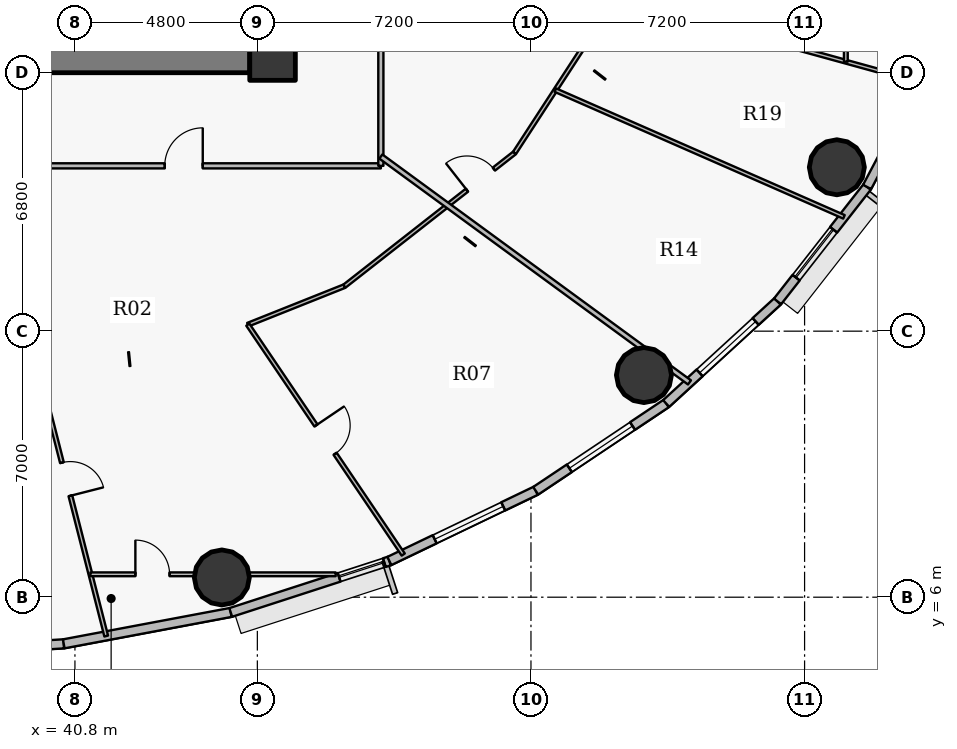
"""IFC4 building model, lengths in metres.
Left out: names, types, materials, properties, quantities, classifications, styles, units other than length and angle.
Written with IfcOpenShell. Run it as: python <this file> out.ifc"""

import sys

from ifc_helpers import new_model, si_unit, direction, frame, frame_2d, origin, origin_2d, place, context, subcontext, project, spatial, rectangle, hollow_circle, extrude, source, transform, mapped, element, fill, save


model = new_model("IFC4")
c1 = context("Model", 3, precision=1e-05, world=origin(), true_north=direction((0.0, 1.0)))
c2 = subcontext(c1, "Body", "Model", "MODEL_VIEW")
j1 = project(units=[si_unit("LENGTHUNIT", "METRE"), si_unit("PLANEANGLEUNIT", "RADIAN")], contexts=[c1])
p1 = place(None, origin())
s1 = spatial("IfcSite", under=j1, at=p1, CompositionType="ELEMENT")
p2 = place(p1, origin())
s2 = spatial("IfcBuilding", under=s1, at=p2, CompositionType="ELEMENT")
p3 = place(p2, frame((0.0, 0.0, 134.7)))
s3 = spatial("IfcBuildingStorey", under=s2, at=p3, CompositionType="ELEMENT", Elevation=134.7)
p4 = place(p3, frame((46.0, 20.2, 0.0), z_axis=(0.0, 0.0, 1.0), x_axis=(1.0, 0.0, 0.0)))
e1 = element("IfcColumn", 1, at=p4, inside=s3, PredefinedType="COLUMN", context=c2, shape_type="SweptSolid", body=[
    extrude(rectangle(XDim=1.2, YDim=1.2, at=origin_2d()), origin(), (0.0, 0.0, 1.0), 3.75),
])
p5 = place(p3, frame((45.4, 20.2, 0.0), z_axis=(0.0, 0.0, 1.0), x_axis=(-1.0, 0.0, 0.0)))
e2 = element("IfcWall", 2, at=p5, inside=s3, PredefinedType="SHEAR", context=c2, shape_type="SweptSolid", body=[
    extrude(rectangle(XDim=18.8, YDim=0.8, at=frame_2d((9.4, 0.0))), origin(), (0.0, 0.0, 1.0), 2.95),
])
p6 = place(p5, frame((10.15, 0.0, 0.0)))
e3 = element("IfcOpeningElement", 3, at=p6, cuts=e2, PredefinedType="OPENING", context=c2, shape_type="SweptSolid", body=[
    extrude(rectangle(XDim=1.15, YDim=2.15, at=origin_2d()), frame((0.575, 0.41, 1.075), z_axis=(0.0, -1.0, 0.0), x_axis=(1.0, 0.0, 0.0)), (0.0, 0.0, 1.0), 0.82),
])
for number, where, z_axis, x_axis in (
    (4, (44.666, 6.519, 0.0), (0.0, 0.0, 1.0), (1.0, 0.0, 0.0)),
    (5, (55.773, 11.844, 0.0), (0.0, 0.0, 1.0), (1.0, 0.0, 0.0)),
    (6, (60.849, 17.312, 0.0), (0.0, 0.0, 1.0), (1.0, 0.0, 0.0)),
):
    element("IfcColumn", number, at=place(p3, frame(where, z_axis=z_axis, x_axis=x_axis)), inside=s3, PredefinedType="COLUMN", context=c2, shape_type="SweptSolid", body=[
        extrude(hollow_circle(Radius=0.725, WallThickness=0.042, at=origin_2d()), origin(), (0.0, 0.0, 1.0), 3.75),
    ])
p7 = place(p3, frame((40.506, 4.773, 0.0), z_axis=(0.0, 0.0, 1.0), x_axis=(-0.998107531589, -0.061492726276, 0.0)))
e7 = element("IfcWall", 7, at=p7, inside=s3, PredefinedType="SOLIDWALL", context=c2, shape_type="SweptSolid", body=[
    extrude(rectangle(XDim=4.514, YDim=0.24, at=frame_2d((2.257, 0.0))), origin(), (0.0, 0.0, 1.0), 3.5),
])
p8 = place(p7, frame((1.257, 0.0, 0.9)))
e8 = element("IfcOpeningElement", 8, at=p8, cuts=e7, PredefinedType="OPENING", context=c2, shape_type="SweptSolid", body=[
    extrude(rectangle(XDim=2.0, YDim=1.75, at=origin_2d()), frame((1.0, 0.13, 0.875), z_axis=(0.0, -1.0, 0.0), x_axis=(1.0, 0.0, 0.0)), (0.0, 0.0, 1.0), 0.26),
])
p9 = place(p3, frame((44.9, 5.599, 0.0), z_axis=(0.0, 0.0, 1.0), x_axis=(-0.982789252177, -0.184730305596, 0.0)))
e9 = element("IfcWall", 9, at=p9, inside=s3, PredefinedType="SOLIDWALL", context=c2, shape_type="SweptSolid", body=[
    extrude(rectangle(XDim=4.471, YDim=0.24, at=frame_2d((2.235, 0.0))), origin(), (0.0, 0.0, 1.0), 3.5),
])
p10 = place(p3, frame((49.074, 6.953, 0.0), z_axis=(0.0, 0.0, 1.0), x_axis=(-0.951211346073, -0.308540070495, 0.0)))
e10 = element("IfcWall", 10, at=p10, inside=s3, PredefinedType="SOLIDWALL", context=c2, shape_type="SweptSolid", body=[
    extrude(rectangle(XDim=4.388, YDim=0.24, at=frame_2d((2.194, 0.0))), origin(), (0.0, 0.0, 1.0), 3.5),
])
p11 = place(p10, frame((0.14, 0.0, 0.9)))
e11 = element("IfcOpeningElement", 11, at=p11, cuts=e10, PredefinedType="OPENING", context=c2, shape_type="SweptSolid", body=[
    extrude(rectangle(XDim=1.25, YDim=1.65, at=origin_2d()), frame((0.625, 0.13, 0.825), z_axis=(0.0, -1.0, 0.0), x_axis=(1.0, 0.0, 0.0)), (0.0, 0.0, 1.0), 0.26),
])
p12 = place(p3, frame((52.925, 8.801, 0.0), z_axis=(0.0, 0.0, 1.0), x_axis=(-0.901589935876, -0.432591709962, 0.0)))
e12 = element("IfcWall", 12, at=p12, inside=s3, PredefinedType="SOLIDWALL", context=c2, shape_type="SweptSolid", body=[
    extrude(rectangle(XDim=4.272, YDim=0.24, at=frame_2d((2.136, 0.0))), origin(), (0.0, 0.0, 1.0), 3.5),
])
p13 = place(p12, frame((0.949, 0.0, 0.9)))
e13 = element("IfcOpeningElement", 13, at=p13, cuts=e12, PredefinedType="OPENING", context=c2, shape_type="SweptSolid", body=[
    extrude(rectangle(XDim=2.0, YDim=1.75, at=origin_2d()), frame((1.0, 0.13, 0.875), z_axis=(0.0, -1.0, 0.0), x_axis=(1.0, 0.0, 0.0)), (0.0, 0.0, 1.0), 0.26),
])
p14 = place(p3, frame((56.358, 11.097, 0.0), z_axis=(0.0, 0.0, 1.0), x_axis=(-0.831221811447, -0.555940914284, 0.0)))
e14 = element("IfcWall", 14, at=p14, inside=s3, PredefinedType="SOLIDWALL", context=c2, shape_type="SweptSolid", body=[
    extrude(rectangle(XDim=4.13, YDim=0.24, at=frame_2d((2.065, 0.0))), origin(), (0.0, 0.0, 1.0), 3.5),
])
p15 = place(p14, frame((1.065, 0.0, 0.9)))
e15 = element("IfcOpeningElement", 15, at=p15, cuts=e14, PredefinedType="OPENING", context=c2, shape_type="SweptSolid", body=[
    extrude(rectangle(XDim=2.0, YDim=1.75, at=origin_2d()), frame((1.0, 0.13, 0.875), z_axis=(0.0, -1.0, 0.0), x_axis=(1.0, 0.0, 0.0)), (0.0, 0.0, 1.0), 0.26),
])
p16 = place(p3, frame((59.289, 13.783, 0.0), z_axis=(0.0, 0.0, 1.0), x_axis=(-0.737113356241, -0.675769117414, 0.0)))
e16 = element("IfcWall", 16, at=p16, inside=s3, PredefinedType="SOLIDWALL", context=c2, shape_type="SweptSolid", body=[
    extrude(rectangle(XDim=3.976, YDim=0.24, at=frame_2d((1.988, 0.0))), origin(), (0.0, 0.0, 1.0), 3.5),
])
p17 = place(p16, frame((0.783, 0.0, 0.9)))
e17 = element("IfcOpeningElement", 17, at=p17, cuts=e16, PredefinedType="OPENING", context=c2, shape_type="SweptSolid", body=[
    extrude(rectangle(XDim=2.0, YDim=1.75, at=origin_2d()), frame((1.0, 0.13, 0.875), z_axis=(0.0, -1.0, 0.0), x_axis=(1.0, 0.0, 0.0)), (0.0, 0.0, 1.0), 0.26),
])
p18 = place(p3, frame((61.645, 16.794, 0.0), z_axis=(0.0, 0.0, 1.0), x_axis=(-0.616272103517, -0.787533297345, 0.0)))
e18 = element("IfcWall", 18, at=p18, inside=s3, PredefinedType="SOLIDWALL", context=c2, shape_type="SweptSolid", body=[
    extrude(rectangle(XDim=3.823, YDim=0.24, at=frame_2d((1.912, 0.0))), origin(), (0.0, 0.0, 1.0), 3.5),
])
p19 = place(p18, frame((1.43, 0.0, 0.9)))
e19 = element("IfcOpeningElement", 19, at=p19, cuts=e18, PredefinedType="OPENING", context=c2, shape_type="SweptSolid", body=[
    extrude(rectangle(XDim=1.6, YDim=1.75, at=origin_2d()), frame((0.8, 0.13, 0.875), z_axis=(0.0, -1.0, 0.0), x_axis=(1.0, 0.0, 0.0)), (0.0, 0.0, 1.0), 0.26),
])
p20 = place(p3, frame((63.37, 20.055, 0.0), z_axis=(0.0, 0.0, 1.0), x_axis=(-0.467614004126, -0.883932770716, 0.0)))
e20 = element("IfcWall", 20, at=p20, inside=s3, PredefinedType="SOLIDWALL", context=c2, shape_type="SweptSolid", body=[
    extrude(rectangle(XDim=3.689, YDim=0.24, at=frame_2d((1.844, 0.0))), origin(), (0.0, 0.0, 1.0), 3.5),
])
p21 = place(p3, frame((38.477, 17.35, 0.0), z_axis=(0.0, 0.0, 1.0), x_axis=(1.0, 0.0, 0.0)))
e21 = element("IfcWall", 21, at=p21, inside=s3, PredefinedType="PARTITIONING", context=c2, shape_type="SweptSolid", body=[
    extrude(rectangle(XDim=10.373, YDim=0.135, at=frame_2d((5.187, 0.0))), origin(), (0.0, 0.0, 1.0), 2.935),
])
p22 = place(p21, frame((4.687, 0.0, 0.0)))
e22 = element("IfcOpeningElement", 22, at=p22, cuts=e21, PredefinedType="OPENING", context=c2, shape_type="SweptSolid", body=[
    extrude(rectangle(XDim=1.0, YDim=2.15, at=origin_2d()), frame((0.5, 0.078, 1.075), z_axis=(0.0, -1.0, 0.0), x_axis=(1.0, 0.0, 0.0)), (0.0, 0.0, 1.0), 0.155),
])
p23 = place(p3, frame((39.92, 11.645, 0.0), z_axis=(0.0, 0.0, 1.0), x_axis=(0.24735773306, -0.968924224021, 0.0)))
e23 = element("IfcWall", 23, at=p23, inside=s3, PredefinedType="PARTITIONING", context=c2, shape_type="SweptSolid", body=[
    extrude(rectangle(XDim=6.881, YDim=0.1, at=frame_2d((3.441, 0.0))), origin(), (0.0, 0.0, 1.0), 2.935),
])
p24 = place(p23, frame((2.172, 0.0, 0.0)))
e24 = element("IfcOpeningElement", 24, at=p24, cuts=e23, PredefinedType="OPENING", context=c2, shape_type="SweptSolid", body=[
    extrude(rectangle(XDim=0.9, YDim=2.1, at=origin_2d()), frame((0.45, 0.06, 1.05), z_axis=(0.0, -1.0, 0.0), x_axis=(1.0, 0.0, 0.0)), (0.0, 0.0, 1.0), 0.12),
])
p25 = place(p3, frame((41.208, 6.603, 0.0), z_axis=(0.0, 0.0, 1.0), x_axis=(1.0, 0.0, 0.0)))
e25 = element("IfcWall", 25, at=p25, inside=s3, PredefinedType="PARTITIONING", context=c2, shape_type="SweptSolid", body=[
    extrude(rectangle(XDim=6.453, YDim=0.1, at=frame_2d((3.227, 0.0))), origin(), (0.0, 0.0, 1.0), 2.935),
])
p26 = place(p25, frame((1.183, 0.0, 0.0)))
e26 = element("IfcOpeningElement", 26, at=p26, cuts=e25, PredefinedType="OPENING", context=c2, shape_type="SweptSolid", body=[
    extrude(rectangle(XDim=0.9, YDim=2.1, at=origin_2d()), frame((0.45, 0.06, 1.05), z_axis=(0.0, -1.0, 0.0), x_axis=(1.0, 0.0, 0.0)), (0.0, 0.0, 1.0), 0.12),
])
p27 = place(p3, frame((45.35, 13.17, 0.0), z_axis=(0.0, 0.0, 1.0), x_axis=(0.928802486491, 0.370575149044, 0.0)))
e27 = element("IfcWall", 27, at=p27, inside=s3, PredefinedType="PARTITIONING", context=c2, shape_type="SweptSolid", body=[
    extrude(rectangle(XDim=2.736, YDim=0.1, at=frame_2d((1.368, 0.0))), origin(), (0.0, 0.0, 1.0), 3.5),
])
p28 = place(p3, frame((45.35, 13.17, 0.0), z_axis=(0.0, 0.0, 1.0), x_axis=(0.560082631059, -0.828436748573, 0.0)))
e28 = element("IfcWall", 28, at=p28, inside=s3, PredefinedType="PARTITIONING", context=c2, shape_type="SweptSolid", body=[
    extrude(rectangle(XDim=7.301, YDim=0.1, at=frame_2d((3.65, 0.0))), origin(), (0.0, 0.0, 1.0), 2.935),
])
p29 = place(p28, frame((3.2, 0.0, 0.0)))
e29 = element("IfcOpeningElement", 29, at=p29, cuts=e28, PredefinedType="OPENING", context=c2, shape_type="SweptSolid", body=[
    extrude(rectangle(XDim=0.9, YDim=2.1, at=origin_2d()), frame((0.45, 0.06, 1.05), z_axis=(0.0, -1.0, 0.0), x_axis=(1.0, 0.0, 0.0)), (0.0, 0.0, 1.0), 0.12),
])
p30 = place(p3, frame((47.891, 14.184, 0.0), z_axis=(0.0, 0.0, 1.0), x_axis=(0.787333679705, 0.616527109544, 0.0)))
e30 = element("IfcWall", 30, at=p30, inside=s3, PredefinedType="PARTITIONING", context=c2, shape_type="SweptSolid", body=[
    extrude(rectangle(XDim=5.685, YDim=0.1, at=frame_2d((2.842, 0.0))), origin(), (0.0, 0.0, 1.0), 2.935),
])
p31 = place(p30, frame((4.096, 0.0, 0.0)))
e31 = element("IfcOpeningElement", 31, at=p31, cuts=e30, PredefinedType="OPENING", context=c2, shape_type="SweptSolid", body=[
    extrude(rectangle(XDim=0.9, YDim=2.1, at=origin_2d()), frame((0.45, 0.06, 1.05), z_axis=(0.0, -1.0, 0.0), x_axis=(1.0, 0.0, 0.0)), (0.0, 0.0, 1.0), 0.12),
])
p32 = place(p3, frame((48.85, 17.35, 0.0), z_axis=(0.0, 0.0, 1.0), x_axis=(0.0, 1.0, 0.0)))
e32 = element("IfcWall", 32, at=p32, inside=s3, PredefinedType="PARTITIONING", context=c2, shape_type="SweptSolid", body=[
    extrude(rectangle(XDim=19.3, YDim=0.135, at=frame_2d((9.65, 0.0))), origin(), (0.0, 0.0, 1.0), 2.935),
])
p33 = place(p32, frame((7.609, 0.0, 0.0)))
e33 = element("IfcOpeningElement", 33, at=p33, cuts=e32, PredefinedType="OPENING", context=c2, shape_type="SweptSolid", body=[
    extrude(rectangle(XDim=1.0, YDim=2.15, at=origin_2d()), frame((0.5, 0.078, 1.075), z_axis=(0.0, -1.0, 0.0), x_axis=(1.0, 0.0, 0.0)), (0.0, 0.0, 1.0), 0.155),
])
p34 = place(p3, frame((48.85, 17.595, 0.0), z_axis=(0.0, 0.0, 1.0), x_axis=(0.806958414, -0.590608261096, 0.0)))
e34 = element("IfcWall", 34, at=p34, inside=s3, PredefinedType="PARTITIONING", context=c2, shape_type="SweptSolid", body=[
    extrude(rectangle(XDim=10.063, YDim=0.135, at=frame_2d((5.032, 0.0))), origin(), (0.0, 0.0, 1.0), 2.935),
])
p35 = place(p3, frame((52.366, 17.689, 0.0), z_axis=(0.0, 0.0, 1.0), x_axis=(0.545413870093, 0.838166874978, 0.0)))
e35 = element("IfcWall", 35, at=p35, inside=s3, PredefinedType="PARTITIONING", context=c2, shape_type="SweptSolid", body=[
    extrude(rectangle(XDim=4.859, YDim=0.1, at=frame_2d((2.43, 0.0))), origin(), (0.0, 0.0, 1.0), 2.935),
])
p36 = place(p3, frame((53.442, 19.342, 0.0), z_axis=(0.0, 0.0, 1.0), x_axis=(0.91563160904, -0.402018353469, 0.0)))
e36 = element("IfcWall", 36, at=p36, inside=s3, PredefinedType="PARTITIONING", context=c2, shape_type="SweptSolid", body=[
    extrude(rectangle(XDim=8.294, YDim=0.1, at=frame_2d((4.147, 0.0))), origin(), (0.0, 0.0, 1.0), 2.935),
])
p37 = place(p3, frame((55.017, 21.762, 0.0), z_axis=(0.0, 0.0, 1.0), x_axis=(0.964092156587, -0.265567907714, 0.0)))
e37 = element("IfcWall", 37, at=p37, inside=s3, PredefinedType="PARTITIONING", context=c2, shape_type="SweptSolid", body=[
    extrude(rectangle(XDim=8.385, YDim=0.1, at=frame_2d((4.192, 0.0))), origin(), (0.0, 0.0, 1.0), 2.935),
])
p38 = place(p37, frame((2.717, 0.0, 0.0)))
e38 = element("IfcOpeningElement", 38, at=p38, cuts=e37, PredefinedType="OPENING", context=c2, shape_type="SweptSolid", body=[
    extrude(rectangle(XDim=0.9, YDim=2.1, at=origin_2d()), frame((0.45, 0.06, 1.05), z_axis=(0.0, -1.0, 0.0), x_axis=(1.0, 0.0, 0.0)), (0.0, 0.0, 1.0), 0.12),
])
p39 = place(p3, frame((61.085, 20.09, 0.0), z_axis=(0.0, 0.0, 1.0), x_axis=(0.0, 1.0, 0.0)))
e39 = element("IfcWall", 39, at=p39, inside=s3, PredefinedType="PARTITIONING", context=c2, shape_type="SweptSolid", body=[
    extrude(rectangle(XDim=9.281, YDim=0.1, at=frame_2d((4.641, 0.0))), origin(), (0.0, 0.0, 1.0), 2.935),
])
p40 = place(p39, frame((4.19, 0.0, 0.0)))
e40 = element("IfcOpeningElement", 40, at=p40, cuts=e39, PredefinedType="OPENING", context=c2, shape_type="SweptSolid", body=[
    extrude(rectangle(XDim=0.9, YDim=2.1, at=origin_2d()), frame((0.45, 0.06, 1.05), z_axis=(0.0, -1.0, 0.0), x_axis=(1.0, 0.0, 0.0)), (0.0, 0.0, 1.0), 0.12),
])
p41 = place(p3, frame((45.41, 19.8, 0.0), z_axis=(0.0, 0.0, 1.0), x_axis=(1.0, 0.0, 0.0)))
e41 = element("IfcWall", 41, at=p41, inside=s3, PredefinedType="PARTITIONING", context=c2, shape_type="SweptSolid", body=[
    extrude(rectangle(XDim=0.99, YDim=0.135, at=frame_2d((0.495, 0.0))), origin(), (0.0, 0.0, 1.0), 2.935),
])
p42 = place(p3, frame((46.4, 20.107, 0.0), z_axis=(0.0, 0.0, 1.0), x_axis=(0.0, 1.0, 0.0)))
e42 = element("IfcWall", 42, at=p42, inside=s3, PredefinedType="PARTITIONING", context=c2, shape_type="SweptSolid", body=[
    extrude(rectangle(XDim=0.683, YDim=0.135, at=frame_2d((0.341, 0.0))), origin(), (0.0, 0.0, 1.0), 3.5),
])
m1 = source(origin(), c2, "Body", "SweptSolid", [
    extrude(rectangle(XDim=2.0, YDim=1.75, at=origin_2d()), frame((1.0, 0.03, 0.875), z_axis=(0.0, -1.0, 0.0), x_axis=(1.0, 0.0, 0.0)), (0.0, 0.0, 1.0), 0.06),
])
p43 = place(p13, origin())
e43 = element("IfcWindow", 43, at=p43, inside=s3, PartitioningType="DOUBLE_PANEL_VERTICAL", PredefinedType="WINDOW", context=c2, shape_type="MappedRepresentation", body=[
    mapped(m1, transform((0.0, 0.0, 0.0), x_axis=(1.0, 0.0, 0.0), y_axis=(0.0, 1.0, 0.0), z_axis=(0.0, 0.0, 1.0), scale=1.0)),
])
fill(e13, e43)
p44 = place(p15, origin())
e44 = element("IfcWindow", 44, at=p44, inside=s3, PartitioningType="DOUBLE_PANEL_VERTICAL", PredefinedType="WINDOW", context=c2, shape_type="MappedRepresentation", body=[
    mapped(m1, transform((0.0, 0.0, 0.0), x_axis=(1.0, 0.0, 0.0), y_axis=(0.0, 1.0, 0.0), z_axis=(0.0, 0.0, 1.0), scale=1.0)),
])
fill(e15, e44)
p45 = place(p17, origin())
e45 = element("IfcWindow", 45, at=p45, inside=s3, PartitioningType="DOUBLE_PANEL_VERTICAL", PredefinedType="WINDOW", context=c2, shape_type="MappedRepresentation", body=[
    mapped(m1, transform((0.0, 0.0, 0.0), x_axis=(1.0, 0.0, 0.0), y_axis=(0.0, 1.0, 0.0), z_axis=(0.0, 0.0, 1.0), scale=1.0)),
])
fill(e17, e45)
m2 = source(origin(), c2, "Body", "SweptSolid", [
    extrude(rectangle(XDim=1.6, YDim=1.75, at=origin_2d()), frame((0.8, 0.03, 0.875), z_axis=(0.0, -1.0, 0.0), x_axis=(1.0, 0.0, 0.0)), (0.0, 0.0, 1.0), 0.06),
])
p46 = place(p19, origin())
e46 = element("IfcWindow", 46, at=p46, inside=s3, PartitioningType="DOUBLE_PANEL_VERTICAL", PredefinedType="WINDOW", context=c2, shape_type="MappedRepresentation", body=[
    mapped(m2, transform((0.0, 0.0, 0.0), x_axis=(1.0, 0.0, 0.0), y_axis=(0.0, 1.0, 0.0), z_axis=(0.0, 0.0, 1.0), scale=1.0)),
])
fill(e19, e46)
m3 = source(origin(), c2, "Body", "SweptSolid", [
    extrude(rectangle(XDim=1.25, YDim=1.65, at=origin_2d()), frame((0.625, 0.03, 0.825), z_axis=(0.0, -1.0, 0.0), x_axis=(1.0, 0.0, 0.0)), (0.0, 0.0, 1.0), 0.06),
])
p47 = place(p11, origin())
e47 = element("IfcWindow", 47, at=p47, inside=s3, PartitioningType="SINGLE_PANEL", PredefinedType="WINDOW", context=c2, shape_type="MappedRepresentation", body=[
    mapped(m3, transform((0.0, 0.0, 0.0), x_axis=(1.0, 0.0, 0.0), y_axis=(0.0, 1.0, 0.0), z_axis=(0.0, 0.0, 1.0), scale=1.0)),
])
fill(e11, e47)
m4 = source(origin(), c2, "Body", "SweptSolid", [
    extrude(rectangle(XDim=1.0, YDim=2.15, at=origin_2d()), frame((0.5, 0.025, 1.075), z_axis=(0.0, -1.0, 0.0), x_axis=(1.0, 0.0, 0.0)), (0.0, 0.0, 1.0), 0.05),
])
p48 = place(p22, origin())
e48 = element("IfcDoor", 48, at=p48, inside=s3, OperationType="SINGLE_SWING_RIGHT", PredefinedType="DOOR", context=c2, shape_type="MappedRepresentation", body=[
    mapped(m4, transform((0.0, 0.0, 0.0), x_axis=(1.0, 0.0, 0.0), y_axis=(0.0, 1.0, 0.0), z_axis=(0.0, 0.0, 1.0), scale=1.0)),
])
fill(e22, e48)
m5 = source(origin(), c2, "Body", "SweptSolid", [
    extrude(rectangle(XDim=0.9, YDim=2.1, at=origin_2d()), frame((0.45, 0.025, 1.05), z_axis=(0.0, -1.0, 0.0), x_axis=(1.0, 0.0, 0.0)), (0.0, 0.0, 1.0), 0.05),
])
p49 = place(p24, origin())
e49 = element("IfcDoor", 49, at=p49, inside=s3, OperationType="SINGLE_SWING_RIGHT", PredefinedType="DOOR", context=c2, shape_type="MappedRepresentation", body=[
    mapped(m5, transform((0.0, 0.0, 0.0), x_axis=(1.0, 0.0, 0.0), y_axis=(0.0, 1.0, 0.0), z_axis=(0.0, 0.0, 1.0), scale=1.0)),
])
fill(e24, e49)
p50 = place(p29, origin())
e50 = element("IfcDoor", 50, at=p50, inside=s3, OperationType="SINGLE_SWING_LEFT", PredefinedType="DOOR", context=c2, shape_type="MappedRepresentation", body=[
    mapped(m5, transform((0.0, 0.0, 0.0), x_axis=(1.0, 0.0, 0.0), y_axis=(0.0, 1.0, 0.0), z_axis=(0.0, 0.0, 1.0), scale=1.0)),
])
fill(e29, e50)
p51 = place(p26, origin())
e51 = element("IfcDoor", 51, at=p51, inside=s3, OperationType="SINGLE_SWING_LEFT", PredefinedType="DOOR", context=c2, shape_type="MappedRepresentation", body=[
    mapped(m5, transform((0.0, 0.0, 0.0), x_axis=(1.0, 0.0, 0.0), y_axis=(0.0, 1.0, 0.0), z_axis=(0.0, 0.0, 1.0), scale=1.0)),
])
fill(e26, e51)
p52 = place(p31, origin())
e52 = element("IfcDoor", 52, at=p52, inside=s3, OperationType="SINGLE_SWING_LEFT", PredefinedType="DOOR", context=c2, shape_type="MappedRepresentation", body=[
    mapped(m5, transform((0.0, 0.0, 0.0), x_axis=(1.0, 0.0, 0.0), y_axis=(0.0, 1.0, 0.0), z_axis=(0.0, 0.0, 1.0), scale=1.0)),
])
fill(e31, e52)
save(model, sys.argv[1])
